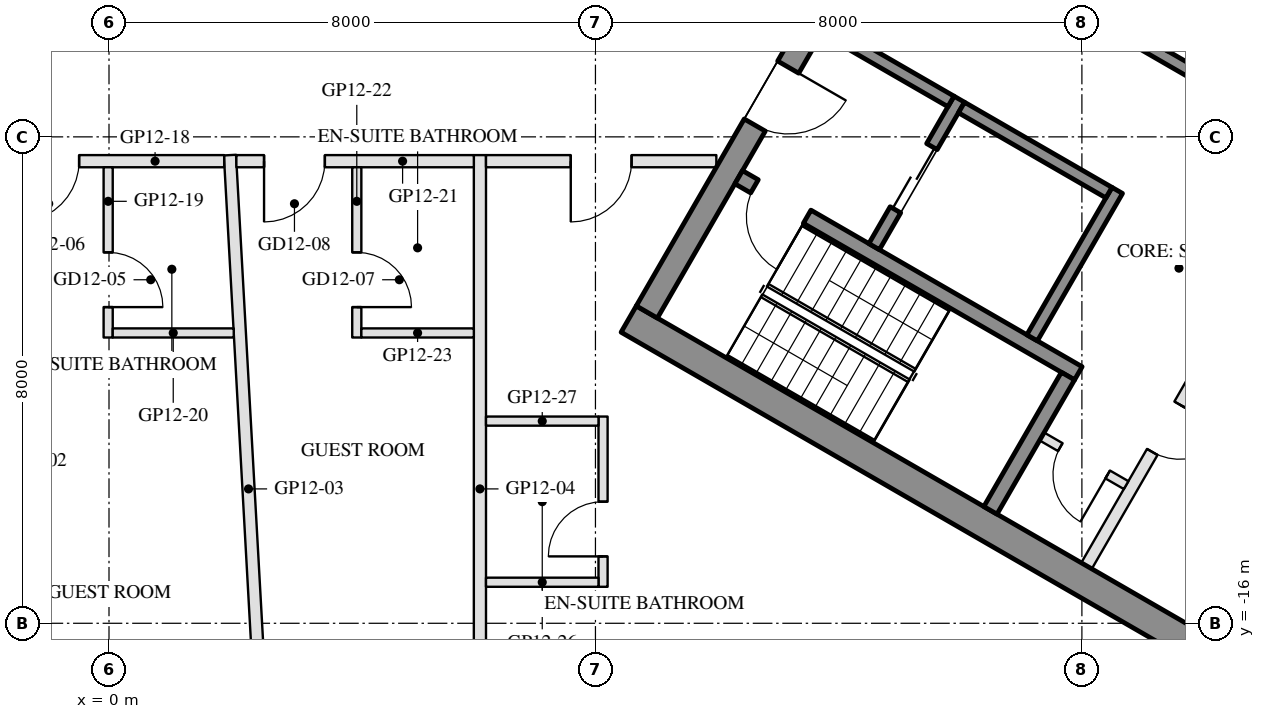
"""IFC4 building model, lengths in metres.
Left out: names, types, materials, properties, quantities, classifications, styles, units other than length and angle.
Written with IfcOpenShell. Run it as: python <this file> out.ifc"""

import sys

from ifc_helpers import new_model, si_unit, direction, frame, frame_2d, origin, place, context, subcontext, project, spatial, rectangle, extrude, element, fill, save


model = new_model("IFC4")
c1 = context("Model", 3, precision=1e-05, world=origin(), true_north=direction((0.0, 1.0)))
c2 = subcontext(c1, "Body", "Model", "MODEL_VIEW")
j1 = project(units=[si_unit("LENGTHUNIT", "METRE"), si_unit("PLANEANGLEUNIT", "RADIAN")], contexts=[c1])
p1 = place(None, origin())
s1 = spatial("IfcSite", under=j1, at=p1, CompositionType="ELEMENT")
p2 = place(p1, origin())
s2 = spatial("IfcBuilding", under=s1, at=p2, CompositionType="ELEMENT")
p3 = place(p2, frame((0.0, 0.0, 150.3)))
s3 = spatial("IfcBuildingStorey", under=s2, at=p3, CompositionType="ELEMENT", Elevation=150.3)
for number, where, z_axis, x_axis in (
    (1, (8.547, -10.997, 0.0), (0.0, 0.0, 1.0), (0.866, -0.5, 0.0)),
    (2, (13.797, -1.903, 0.0), (0.0, 0.0, 1.0), (0.866, -0.5, 0.0)),
):
    element("IfcWall", number, at=place(p3, frame(where, z_axis=z_axis, x_axis=x_axis)), inside=s3, PredefinedType="SHEAR", context=c2, shape_type="SweptSolid", body=[
        extrude(rectangle(XDim=14.837, YDim=0.5, at=frame_2d((7.418, 0.0))), origin(), (0.0, 0.0, 1.0), 3.5),
    ])
p4 = place(p3, frame((8.845, -10.88, 0.0), z_axis=(0.0, 0.0, 1.0), x_axis=(0.500004234368, 0.866022959057, 0.0)))
e3 = element("IfcWall", 3, at=p4, inside=s3, PredefinedType="SHEAR", context=c2, shape_type="SweptSolid", body=[
    extrude(rectangle(XDim=10.0, YDim=0.4, at=frame_2d((5.0, 0.0))), origin(), (0.0, 0.0, 1.0), 3.5),
])
p5 = place(p4, frame((3.55, 0.0, 0.0)))
e4 = element("IfcOpeningElement", 4, at=p5, cuts=e3, PredefinedType="OPENING", context=c2, shape_type="SweptSolid", body=[
    extrude(rectangle(XDim=1.1, YDim=2.1, at=frame_2d((0.55, 1.05))), frame((0.0, 0.21, 0.0), z_axis=(0.0, -1.0, 0.0), x_axis=(1.0, 0.0, 0.0)), (0.0, 0.0, 1.0), 0.42),
])
p6 = place(p4, frame((5.85, 0.0, 0.0)))
e5 = element("IfcOpeningElement", 5, at=p6, cuts=e3, PredefinedType="OPENING", context=c2, shape_type="SweptSolid", body=[
    extrude(rectangle(XDim=1.4, YDim=2.1, at=frame_2d((0.7, 1.05))), frame((0.0, 0.21, 0.0), z_axis=(0.0, -1.0, 0.0), x_axis=(1.0, 0.0, 0.0)), (0.0, 0.0, 1.0), 0.42),
])
p7 = place(p3, frame((10.356, -8.664, 0.0), z_axis=(0.0, 0.0, 1.0), x_axis=(0.866028629588, -0.499994412703, 0.0)))
e6 = element("IfcWall", 6, at=p7, inside=s3, PredefinedType="SHEAR", context=c2, shape_type="SweptSolid", body=[
    extrude(rectangle(XDim=6.45, YDim=0.25, at=frame_2d((3.225, 0.0))), origin(), (0.0, 0.0, 1.0), 3.5),
])
p8 = place(p7, frame((0.3, 0.0, 0.0)))
e7 = element("IfcOpeningElement", 7, at=p8, cuts=e6, PredefinedType="OPENING", context=c2, shape_type="SweptSolid", body=[
    extrude(rectangle(XDim=1.0, YDim=2.1, at=frame_2d((0.5, 1.05))), frame((0.0, 0.135, 0.0), z_axis=(0.0, -1.0, 0.0), x_axis=(1.0, 0.0, 0.0)), (0.0, 0.0, 1.0), 0.27),
])
p9 = place(p3, frame((14.496, -14.143, 0.0), z_axis=(0.0, 0.0, 1.0), x_axis=(0.500062241894, 0.865989465428, 0.0)))
e8 = element("IfcWall", 8, at=p9, inside=s3, PredefinedType="SHEAR", context=c2, shape_type="SweptSolid", body=[
    extrude(rectangle(XDim=2.55, YDim=0.25, at=frame_2d((1.275, 0.0))), origin(), (0.0, 0.0, 1.0), 3.5),
])
p10 = place(p3, frame((15.181, -11.305, 0.0), z_axis=(0.0, 0.0, 1.0), x_axis=(0.49994636267, 0.866056369097, 0.0)))
e9 = element("IfcWall", 9, at=p10, inside=s3, PredefinedType="SHEAR", context=c2, shape_type="SweptSolid", body=[
    extrude(rectangle(XDim=2.8, YDim=0.2, at=frame_2d((1.4, 0.0))), origin(), (0.0, 0.0, 1.0), 3.5),
])
p11 = place(p3, frame((12.583, -9.805, 0.0), z_axis=(0.0, 0.0, 1.0), x_axis=(0.49994636267, 0.866056369097, 0.0)))
e10 = element("IfcWall", 10, at=p11, inside=s3, PredefinedType="SHEAR", context=c2, shape_type="SweptSolid", body=[
    extrude(rectangle(XDim=2.8, YDim=0.2, at=frame_2d((1.4, 0.0))), origin(), (0.0, 0.0, 1.0), 3.5),
])
p12 = place(p11, frame((0.7, 0.0, 0.0)))
e11 = element("IfcOpeningElement", 11, at=p12, cuts=e10, PredefinedType="OPENING", context=c2, shape_type="SweptSolid", body=[
    extrude(rectangle(XDim=1.2, YDim=2.1, at=frame_2d((0.6, 1.05))), frame((0.0, 0.11, 0.0), z_axis=(0.0, -1.0, 0.0), x_axis=(1.0, 0.0, 0.0)), (0.0, 0.0, 1.0), 0.22),
])
p13 = place(p3, frame((11.768, -6.217, 0.0), z_axis=(0.0, 0.0, 1.0), x_axis=(0.866050077142, -0.499957262057, 0.0)))
e12 = element("IfcWall", 12, at=p13, inside=s3, PredefinedType="SHEAR", context=c2, shape_type="SweptSolid", body=[
    extrude(rectangle(XDim=2.4, YDim=0.2, at=frame_2d((1.2, 0.0))), origin(), (0.0, 0.0, 1.0), 3.5),
])
p14 = place(p3, frame((14.02, -7.517, 0.0), z_axis=(0.0, 0.0, 1.0), x_axis=(0.866034573852, -0.49998411664, 0.0)))
e13 = element("IfcWall", 13, at=p14, inside=s3, PredefinedType="SHEAR", context=c2, shape_type="SweptSolid", body=[
    extrude(rectangle(XDim=2.8, YDim=0.2, at=frame_2d((1.4, 0.0))), origin(), (0.0, 0.0, 1.0), 3.5),
])
p15 = place(p3, frame((12.968, -4.138, 0.0), z_axis=(0.0, 0.0, 1.0), x_axis=(0.866028328073, -0.49999493495, 0.0)))
e14 = element("IfcWall", 14, at=p15, inside=s3, PredefinedType="SHEAR", context=c2, shape_type="SweptSolid", body=[
    extrude(rectangle(XDim=10.16, YDim=0.2, at=frame_2d((5.08, 0.0))), origin(), (0.0, 0.0, 1.0), 3.5),
])
p16 = place(p15, frame((1.99, 0.0, 0.0)))
e15 = element("IfcOpeningElement", 15, at=p16, cuts=e14, PredefinedType="OPENING", context=c2, shape_type="SweptSolid", body=[
    extrude(rectangle(XDim=0.9, YDim=2.1, at=frame_2d((0.45, 1.05))), frame((0.0, 0.11, 0.0), z_axis=(0.0, -1.0, 0.0), x_axis=(1.0, 0.0, 0.0)), (0.0, 0.0, 1.0), 0.22),
])
p17 = place(p15, frame((7.07, 0.0, 0.0)))
e16 = element("IfcOpeningElement", 16, at=p17, cuts=e14, PredefinedType="OPENING", context=c2, shape_type="SweptSolid", body=[
    extrude(rectangle(XDim=0.9, YDim=2.1, at=frame_2d((0.45, 1.05))), frame((0.0, 0.11, 0.0), z_axis=(0.0, -1.0, 0.0), x_axis=(1.0, 0.0, 0.0)), (0.0, 0.0, 1.0), 0.22),
])
p18 = place(p3, frame((16.076, -15.055, 0.0), z_axis=(0.0, 0.0, 1.0), x_axis=(0.499995103361, 0.866028230842, 0.0)))
e17 = element("IfcWall", 17, at=p18, inside=s3, PredefinedType="PARTITIONING", context=c2, shape_type="SweptSolid", body=[
    extrude(rectangle(XDim=5.4, YDim=0.2, at=frame_2d((2.7, 0.0))), origin(), (0.0, 0.0, 1.0), 3.5),
])
p19 = place(p18, frame((2.163, 0.0, 0.0)))
e18 = element("IfcOpeningElement", 18, at=p19, cuts=e17, PredefinedType="OPENING", context=c2, shape_type="SweptSolid", body=[
    extrude(rectangle(XDim=0.9, YDim=2.1, at=frame_2d((0.45, 1.05))), frame((0.0, 0.11, 0.0), z_axis=(0.0, -1.0, 0.0), x_axis=(1.0, 0.0, 0.0)), (0.0, 0.0, 1.0), 0.22),
])
p20 = place(p18, frame((4.038, 0.0, 0.0)))
e19 = element("IfcOpeningElement", 19, at=p20, cuts=e17, PredefinedType="OPENING", context=c2, shape_type="SweptSolid", body=[
    extrude(rectangle(XDim=0.9, YDim=2.1, at=frame_2d((0.45, 1.05))), frame((0.0, 0.11, 0.0), z_axis=(0.0, -1.0, 0.0), x_axis=(1.0, 0.0, 0.0)), (0.0, 0.0, 1.0), 0.22),
])
p21 = place(p3, frame((15.342, -12.928, 0.0), z_axis=(0.0, 0.0, 1.0), x_axis=(0.865989903783, -0.500061482766, 0.0)))
e20 = element("IfcWall", 20, at=p21, inside=s3, PredefinedType="PARTITIONING", context=c2, shape_type="SweptSolid", body=[
    extrude(rectangle(XDim=1.6, YDim=0.15, at=frame_2d((0.8, 0.0))), origin(), (0.0, 0.0, 1.0), 3.5),
])
p22 = place(p21, frame((0.35, 0.0, 0.0)))
e21 = element("IfcOpeningElement", 21, at=p22, cuts=e20, PredefinedType="OPENING", context=c2, shape_type="SweptSolid", body=[
    extrude(rectangle(XDim=0.9, YDim=2.1, at=frame_2d((0.45, 1.05))), frame((0.0, 0.085, 0.0), z_axis=(0.0, -1.0, 0.0), x_axis=(1.0, 0.0, 0.0)), (0.0, 0.0, 1.0), 0.17),
])
p23 = place(p3, frame((2.6, -19.28, 0.0), z_axis=(0.0, 0.0, 1.0), x_axis=(-0.055568385591, 0.998454883569, 0.0)))
e22 = element("IfcWall", 22, at=p23, inside=s3, PredefinedType="PARTITIONING", context=c2, shape_type="SweptSolid", body=[
    extrude(rectangle(XDim=10.997, YDim=0.2, at=frame_2d((5.499, 0.0))), origin(), (0.0, 0.0, 1.0), 3.06),
])
p24 = place(p3, frame((6.1, -19.28, 0.0), z_axis=(0.0, 0.0, 1.0), x_axis=(0.0, 1.0, 0.0)))
e23 = element("IfcWall", 23, at=p24, inside=s3, PredefinedType="PARTITIONING", context=c2, shape_type="SweptSolid", body=[
    extrude(rectangle(XDim=10.98, YDim=0.2, at=frame_2d((5.49, 0.0))), origin(), (0.0, 0.0, 1.0), 3.06),
])
p25 = place(p3, frame((1.894, -8.4, 0.0), z_axis=(0.0, 0.0, 1.0), x_axis=(-1.0, 0.0, 0.0)))
e24 = element("IfcWall", 24, at=p25, inside=s3, PredefinedType="PARTITIONING", context=c2, shape_type="SweptSolid", body=[
    extrude(rectangle(XDim=3.789, YDim=0.2, at=frame_2d((1.894, 0.0))), origin(), (0.0, 0.0, 1.0), 2.95),
])
p26 = place(p25, frame((2.386, 0.0, 0.0)))
e25 = element("IfcOpeningElement", 25, at=p26, cuts=e24, PredefinedType="OPENING", context=c2, shape_type="SweptSolid", body=[
    extrude(rectangle(XDim=1.0, YDim=2.1, at=frame_2d((0.5, 1.05))), frame((0.0, 0.11, 0.0), z_axis=(0.0, -1.0, 0.0), x_axis=(1.0, 0.0, 0.0)), (0.0, 0.0, 1.0), 0.22),
])
p27 = place(p3, frame((-0.014, -8.5, 0.0), z_axis=(0.0, 0.0, 1.0), x_axis=(0.0, -1.0, 0.0)))
e26 = element("IfcWall", 26, at=p27, inside=s3, PredefinedType="PARTITIONING", context=c2, shape_type="SweptSolid", body=[
    extrude(rectangle(XDim=2.8, YDim=0.15, at=frame_2d((1.4, 0.0))), origin(), (0.0, 0.0, 1.0), 2.95),
])
p28 = place(p27, frame((1.4, 0.0, 0.0)))
e27 = element("IfcOpeningElement", 27, at=p28, cuts=e26, PredefinedType="OPENING", context=c2, shape_type="SweptSolid", body=[
    extrude(rectangle(XDim=0.9, YDim=2.1, at=frame_2d((0.45, 1.05))), frame((0.0, 0.085, 0.0), z_axis=(0.0, -1.0, 0.0), x_axis=(1.0, 0.0, 0.0)), (0.0, 0.0, 1.0), 0.17),
])
p29 = place(p3, frame((0.061, -11.225, 0.0), z_axis=(0.0, 0.0, 1.0), x_axis=(1.0, 0.0, 0.0)))
e28 = element("IfcWall", 28, at=p29, inside=s3, PredefinedType="PARTITIONING", context=c2, shape_type="SweptSolid", body=[
    extrude(rectangle(XDim=1.99, YDim=0.15, at=frame_2d((0.995, 0.0))), origin(), (0.0, 0.0, 1.0), 2.95),
])
p30 = place(p3, frame((6.0, -8.4, 0.0), z_axis=(0.0, 0.0, 1.0), x_axis=(-1.0, 0.0, 0.0)))
e29 = element("IfcWall", 29, at=p30, inside=s3, PredefinedType="PARTITIONING", context=c2, shape_type="SweptSolid", body=[
    extrude(rectangle(XDim=3.906, YDim=0.2, at=frame_2d((1.953, 0.0))), origin(), (0.0, 0.0, 1.0), 2.95),
])
p31 = place(p30, frame((2.45, 0.0, 0.0)))
e30 = element("IfcOpeningElement", 30, at=p31, cuts=e29, PredefinedType="OPENING", context=c2, shape_type="SweptSolid", body=[
    extrude(rectangle(XDim=1.0, YDim=2.1, at=frame_2d((0.5, 1.05))), frame((0.0, 0.11, 0.0), z_axis=(0.0, -1.0, 0.0), x_axis=(1.0, 0.0, 0.0)), (0.0, 0.0, 1.0), 0.22),
])
p32 = place(p3, frame((4.075, -8.5, 0.0), z_axis=(0.0, 0.0, 1.0), x_axis=(0.0, -1.0, 0.0)))
e31 = element("IfcWall", 31, at=p32, inside=s3, PredefinedType="PARTITIONING", context=c2, shape_type="SweptSolid", body=[
    extrude(rectangle(XDim=2.8, YDim=0.15, at=frame_2d((1.4, 0.0))), origin(), (0.0, 0.0, 1.0), 2.95),
])
p33 = place(p32, frame((1.4, 0.0, 0.0)))
e32 = element("IfcOpeningElement", 32, at=p33, cuts=e31, PredefinedType="OPENING", context=c2, shape_type="SweptSolid", body=[
    extrude(rectangle(XDim=0.9, YDim=2.1, at=frame_2d((0.45, 1.05))), frame((0.0, 0.085, 0.0), z_axis=(0.0, -1.0, 0.0), x_axis=(1.0, 0.0, 0.0)), (0.0, 0.0, 1.0), 0.17),
])
p34 = place(p3, frame((4.15, -11.225, 0.0), z_axis=(0.0, 0.0, 1.0), x_axis=(1.0, 0.0, 0.0)))
e33 = element("IfcWall", 33, at=p34, inside=s3, PredefinedType="PARTITIONING", context=c2, shape_type="SweptSolid", body=[
    extrude(rectangle(XDim=1.85, YDim=0.15, at=frame_2d((0.925, 0.0))), origin(), (0.0, 0.0, 1.0), 3.55),
])
p35 = place(p3, frame((9.988, -8.4, 0.0), z_axis=(0.0, 0.0, 1.0), x_axis=(-1.0, 0.0, 0.0)))
e34 = element("IfcWall", 34, at=p35, inside=s3, PredefinedType="PARTITIONING", context=c2, shape_type="SweptSolid", body=[
    extrude(rectangle(XDim=3.788, YDim=0.2, at=frame_2d((1.894, 0.0))), origin(), (0.0, 0.0, 1.0), 2.95),
])
p36 = place(p35, frame((1.394, 0.0, 0.0)))
e35 = element("IfcOpeningElement", 35, at=p36, cuts=e34, PredefinedType="OPENING", context=c2, shape_type="SweptSolid", body=[
    extrude(rectangle(XDim=1.0, YDim=2.1, at=frame_2d((0.5, 1.05))), frame((0.0, 0.11, 0.0), z_axis=(0.0, -1.0, 0.0), x_axis=(1.0, 0.0, 0.0)), (0.0, 0.0, 1.0), 0.22),
])
p37 = place(p3, frame((8.125, -15.4, 0.0), z_axis=(0.0, 0.0, 1.0), x_axis=(0.0, 1.0, 0.0)))
e36 = element("IfcWall", 36, at=p37, inside=s3, PredefinedType="PARTITIONING", context=c2, shape_type="SweptSolid", body=[
    extrude(rectangle(XDim=2.8, YDim=0.15, at=frame_2d((1.4, 0.0))), origin(), (0.0, 0.0, 1.0), 3.55),
])
p38 = place(p37, frame((0.5, 0.0, 0.0)))
e37 = element("IfcOpeningElement", 37, at=p38, cuts=e36, PredefinedType="OPENING", context=c2, shape_type="SweptSolid", body=[
    extrude(rectangle(XDim=0.9, YDim=2.1, at=frame_2d((0.45, 1.05))), frame((0.0, 0.085, 0.0), z_axis=(0.0, -1.0, 0.0), x_axis=(1.0, 0.0, 0.0)), (0.0, 0.0, 1.0), 0.17),
])
for number, where, z_axis, x_axis in (
    (38, (6.2, -15.325, 0.0), (0.0, 0.0, 1.0), (1.0, 0.0, 0.0)),
    (39, (6.2, -12.675, 0.0), (0.0, 0.0, 1.0), (1.0, 0.0, 0.0)),
):
    element("IfcWall", number, at=place(p3, frame(where, z_axis=z_axis, x_axis=x_axis)), inside=s3, PredefinedType="PARTITIONING", context=c2, shape_type="SweptSolid", body=[
        extrude(rectangle(XDim=1.85, YDim=0.15, at=frame_2d((0.925, 0.0))), origin(), (0.0, 0.0, 1.0), 2.95),
    ])
p39 = place(p12, origin())
e40 = element("IfcDoor", 40, at=p39, inside=s3, OperationType="DOUBLE_DOOR_SLIDING", PredefinedType="DOOR", context=c2, shape_type="SweptSolid", body=[
    extrude(rectangle(XDim=1.2, YDim=2.1, at=frame_2d((0.6, 1.05))), frame((0.0, 0.025, 0.0), z_axis=(0.0, -1.0, 0.0), x_axis=(1.0, 0.0, 0.0)), (0.0, 0.0, 1.0), 0.05),
])
fill(e11, e40)
p40 = place(p22, frame((0.9, 0.0, 0.0), z_axis=(0.0, 0.0, 1.0), x_axis=(-1.0, 0.0, 0.0)))
e41 = element("IfcDoor", 41, at=p40, inside=s3, OperationType="SINGLE_SWING_LEFT", PredefinedType="DOOR", context=c2, shape_type="SweptSolid", body=[
    extrude(rectangle(XDim=0.9, YDim=2.1, at=frame_2d((0.45, 1.05))), frame((0.0, 0.025, 0.0), z_axis=(0.0, -1.0, 0.0), x_axis=(1.0, 0.0, 0.0)), (0.0, 0.0, 1.0), 0.05),
])
fill(e21, e41)
p41 = place(p19, frame((0.9, 0.0, 0.0), z_axis=(0.0, 0.0, 1.0), x_axis=(-1.0, 0.0, 0.0)))
e42 = element("IfcDoor", 42, at=p41, inside=s3, OperationType="SINGLE_SWING_LEFT", PredefinedType="DOOR", context=c2, shape_type="SweptSolid", body=[
    extrude(rectangle(XDim=0.9, YDim=2.1, at=frame_2d((0.45, 1.05))), frame((0.0, 0.025, 0.0), z_axis=(0.0, -1.0, 0.0), x_axis=(1.0, 0.0, 0.0)), (0.0, 0.0, 1.0), 0.05),
])
fill(e18, e42)
p42 = place(p5, frame((1.1, 0.0, 0.0), z_axis=(0.0, 0.0, 1.0), x_axis=(-1.0, 0.0, 0.0)))
e43 = element("IfcDoor", 43, at=p42, inside=s3, OperationType="SINGLE_SWING_LEFT", PredefinedType="DOOR", context=c2, shape_type="SweptSolid", body=[
    extrude(rectangle(XDim=1.1, YDim=2.1, at=frame_2d((0.55, 1.05))), frame((0.0, 0.025, 0.0), z_axis=(0.0, -1.0, 0.0), x_axis=(1.0, 0.0, 0.0)), (0.0, 0.0, 1.0), 0.05),
])
fill(e4, e43)
p43 = place(p8, frame((1.0, 0.0, 0.0), z_axis=(0.0, 0.0, 1.0), x_axis=(-1.0, 0.0, 0.0)))
e44 = element("IfcDoor", 44, at=p43, inside=s3, OperationType="SINGLE_SWING_LEFT", PredefinedType="DOOR", context=c2, shape_type="SweptSolid", body=[
    extrude(rectangle(XDim=1.0, YDim=2.1, at=frame_2d((0.5, 1.05))), frame((0.0, 0.025, 0.0), z_axis=(0.0, -1.0, 0.0), x_axis=(1.0, 0.0, 0.0)), (0.0, 0.0, 1.0), 0.05),
])
fill(e7, e44)
p44 = place(p28, origin())
e45 = element("IfcDoor", 45, at=p44, inside=s3, OperationType="SINGLE_SWING_RIGHT", PredefinedType="DOOR", context=c2, shape_type="SweptSolid", body=[
    extrude(rectangle(XDim=0.9, YDim=2.1, at=frame_2d((0.45, 1.05))), frame((0.0, 0.025, 0.0), z_axis=(0.0, -1.0, 0.0), x_axis=(1.0, 0.0, 0.0)), (0.0, 0.0, 1.0), 0.05),
])
fill(e27, e45)
p45 = place(p26, origin())
e46 = element("IfcDoor", 46, at=p45, inside=s3, OperationType="SINGLE_SWING_RIGHT", PredefinedType="DOOR", context=c2, shape_type="SweptSolid", body=[
    extrude(rectangle(XDim=1.0, YDim=2.1, at=frame_2d((0.5, 1.05))), frame((0.0, 0.025, 0.0), z_axis=(0.0, -1.0, 0.0), x_axis=(1.0, 0.0, 0.0)), (0.0, 0.0, 1.0), 0.05),
])
fill(e25, e46)
p46 = place(p33, origin())
e47 = element("IfcDoor", 47, at=p46, inside=s3, OperationType="SINGLE_SWING_RIGHT", PredefinedType="DOOR", context=c2, shape_type="SweptSolid", body=[
    extrude(rectangle(XDim=0.9, YDim=2.1, at=frame_2d((0.45, 1.05))), frame((0.0, 0.025, 0.0), z_axis=(0.0, -1.0, 0.0), x_axis=(1.0, 0.0, 0.0)), (0.0, 0.0, 1.0), 0.05),
])
fill(e32, e47)
p47 = place(p31, origin())
e48 = element("IfcDoor", 48, at=p47, inside=s3, OperationType="SINGLE_SWING_RIGHT", PredefinedType="DOOR", context=c2, shape_type="SweptSolid", body=[
    extrude(rectangle(XDim=1.0, YDim=2.1, at=frame_2d((0.5, 1.05))), frame((0.0, 0.025, 0.0), z_axis=(0.0, -1.0, 0.0), x_axis=(1.0, 0.0, 0.0)), (0.0, 0.0, 1.0), 0.05),
])
fill(e30, e48)
p48 = place(p38, origin())
e49 = element("IfcDoor", 49, at=p48, inside=s3, OperationType="SINGLE_SWING_LEFT", PredefinedType="DOOR", context=c2, shape_type="SweptSolid", body=[
    extrude(rectangle(XDim=0.9, YDim=2.1, at=frame_2d((0.45, 1.05))), frame((0.0, 0.025, 0.0), z_axis=(0.0, -1.0, 0.0), x_axis=(1.0, 0.0, 0.0)), (0.0, 0.0, 1.0), 0.05),
])
fill(e37, e49)
p49 = place(p36, origin())
e50 = element("IfcDoor", 50, at=p49, inside=s3, OperationType="SINGLE_SWING_RIGHT", PredefinedType="DOOR", context=c2, shape_type="SweptSolid", body=[
    extrude(rectangle(XDim=1.0, YDim=2.1, at=frame_2d((0.5, 1.05))), frame((0.0, 0.025, 0.0), z_axis=(0.0, -1.0, 0.0), x_axis=(1.0, 0.0, 0.0)), (0.0, 0.0, 1.0), 0.05),
])
fill(e35, e50)
save(model, sys.argv[1])
